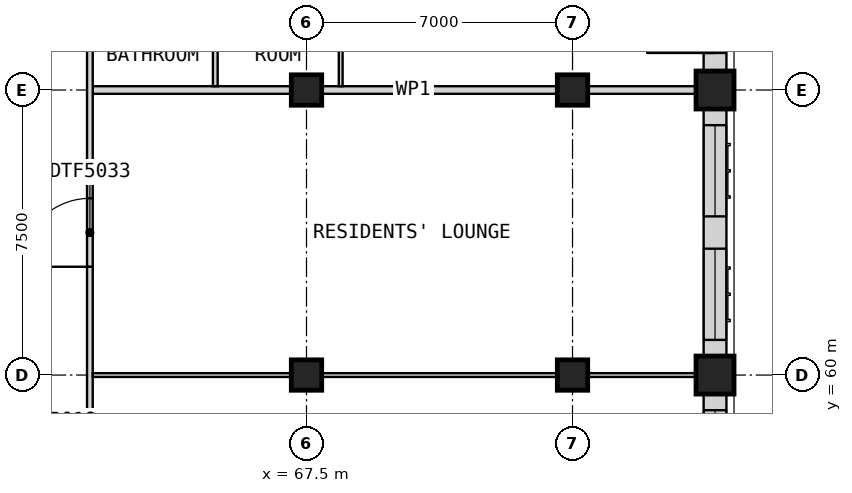
"""IFC4 building model, lengths in metres.
Left out: names, types, materials, properties, quantities, classifications, styles, units other than length and angle.
Written with IfcOpenShell. Run it as: python <this file> out.ifc"""

import sys

from ifc_helpers import new_model, si_unit, direction, frame, frame_2d, origin, origin_2d, place, context, subcontext, project, spatial, rectangle, extrude, element, fill, save


model = new_model("IFC4")
c1 = context("Model", 3, precision=1e-05, world=origin(), true_north=direction((0.0, 1.0)))
c2 = subcontext(c1, "Body", "Model", "MODEL_VIEW")
j1 = project(units=[si_unit("LENGTHUNIT", "METRE"), si_unit("PLANEANGLEUNIT", "RADIAN")], contexts=[c1])
p1 = place(None, origin())
s1 = spatial("IfcSite", under=j1, at=p1, CompositionType="ELEMENT")
p2 = place(p1, origin())
s2 = spatial("IfcBuilding", under=s1, at=p2, CompositionType="ELEMENT")
p3 = place(p2, frame((0.0, 0.0, 219.7)))
s3 = spatial("IfcBuildingStorey", under=s2, at=p3, CompositionType="ELEMENT", Elevation=219.7)
for number, where, z_axis, x_axis in (
    (1, (78.25, 60.0, 0.0), (0.0, 0.0, 1.0), (1.0, 0.0, 0.0)),
    (2, (78.25, 67.5, 0.0), (0.0, 0.0, 1.0), (1.0, 0.0, 0.0)),
):
    element("IfcColumn", number, at=place(p3, frame(where, z_axis=z_axis, x_axis=x_axis)), inside=s3, PredefinedType="COLUMN", context=c2, shape_type="SweptSolid", body=[
        extrude(rectangle(XDim=1.0, YDim=1.0, at=origin_2d()), origin(), (0.0, 0.0, 1.0), 3.5),
    ])
for number, where, z_axis, x_axis in (
    (3, (67.5, 60.0, 0.0), (0.0, 0.0, 1.0), (1.0, 0.0, 0.0)),
    (4, (67.5, 67.5, 0.0), (0.0, 0.0, 1.0), (1.0, 0.0, 0.0)),
    (5, (74.5, 60.0, 0.0), (0.0, 0.0, 1.0), (1.0, 0.0, 0.0)),
    (6, (74.5, 67.5, 0.0), (0.0, 0.0, 1.0), (1.0, 0.0, 0.0)),
):
    element("IfcColumn", number, at=place(p3, frame(where, z_axis=z_axis, x_axis=x_axis)), inside=s3, PredefinedType="COLUMN", context=c2, shape_type="SweptSolid", body=[
        extrude(rectangle(XDim=0.8, YDim=0.8, at=origin_2d()), origin(), (0.0, 0.0, 1.0), 3.5),
    ])
p4 = place(p3, frame((78.25, 53.0, 0.0), z_axis=(0.0, 0.0, 1.0), x_axis=(0.0, 1.0, 0.0)))
e7 = element("IfcWall", 7, at=p4, inside=s3, PredefinedType="SOLIDWALL", context=c2, shape_type="SweptSolid", body=[
    extrude(rectangle(XDim=6.5, YDim=0.6, at=frame_2d((3.25, 0.0))), origin(), (0.0, 0.0, 1.0), 2.75),
])
p5 = place(p4, frame((0.425, 0.0, 0.8)))
e8 = element("IfcOpeningElement", 8, at=p5, cuts=e7, PredefinedType="OPENING", context=c2, shape_type="SweptSolid", body=[
    extrude(rectangle(XDim=2.4, YDim=1.8, at=frame_2d((1.2, 0.9))), frame((0.0, 0.31, 0.0), z_axis=(0.0, -1.0, 0.0), x_axis=(1.0, 0.0, 0.0)), (0.0, 0.0, 1.0), 0.62),
])
p6 = place(p4, frame((3.675, 0.0, 0.8)))
e9 = element("IfcOpeningElement", 9, at=p6, cuts=e7, PredefinedType="OPENING", context=c2, shape_type="SweptSolid", body=[
    extrude(rectangle(XDim=2.4, YDim=1.8, at=frame_2d((1.2, 0.9))), frame((0.0, 0.31, 0.0), z_axis=(0.0, -1.0, 0.0), x_axis=(1.0, 0.0, 0.0)), (0.0, 0.0, 1.0), 0.62),
])
p7 = place(p3, frame((78.25, 60.5, 0.0), z_axis=(0.0, 0.0, 1.0), x_axis=(0.0, 1.0, 0.0)))
e10 = element("IfcWall", 10, at=p7, inside=s3, PredefinedType="SOLIDWALL", context=c2, shape_type="SweptSolid", body=[
    extrude(rectangle(XDim=6.5, YDim=0.6, at=frame_2d((3.25, 0.0))), origin(), (0.0, 0.0, 1.0), 2.75),
])
p8 = place(p7, frame((0.425, 0.0, 0.8)))
e11 = element("IfcOpeningElement", 11, at=p8, cuts=e10, PredefinedType="OPENING", context=c2, shape_type="SweptSolid", body=[
    extrude(rectangle(XDim=2.4, YDim=1.8, at=frame_2d((1.2, 0.9))), frame((0.0, 0.31, 0.0), z_axis=(0.0, -1.0, 0.0), x_axis=(1.0, 0.0, 0.0)), (0.0, 0.0, 1.0), 0.62),
])
p9 = place(p7, frame((3.675, 0.0, 0.8)))
e12 = element("IfcOpeningElement", 12, at=p9, cuts=e10, PredefinedType="OPENING", context=c2, shape_type="SweptSolid", body=[
    extrude(rectangle(XDim=2.4, YDim=1.8, at=frame_2d((1.2, 0.9))), frame((0.0, 0.31, 0.0), z_axis=(0.0, -1.0, 0.0), x_axis=(1.0, 0.0, 0.0)), (0.0, 0.0, 1.0), 0.62),
])
p10 = place(p3, frame((78.25, 68.0, 0.0), z_axis=(0.0, 0.0, 1.0), x_axis=(0.0, 1.0, 0.0)))
e13 = element("IfcWall", 13, at=p10, inside=s3, PredefinedType="SOLIDWALL", context=c2, shape_type="SweptSolid", body=[
    extrude(rectangle(XDim=6.5, YDim=0.6, at=frame_2d((3.25, 0.0))), origin(), (0.0, 0.0, 1.0), 2.75),
])
p11 = place(p10, frame((0.475, 0.0, 0.0)))
e14 = element("IfcOpeningElement", 14, at=p11, cuts=e13, PredefinedType="OPENING", context=c2, shape_type="SweptSolid", body=[
    extrude(rectangle(XDim=1.8, YDim=2.4, at=frame_2d((0.9, 1.2))), frame((0.0, 0.31, 0.0), z_axis=(0.0, -1.0, 0.0), x_axis=(1.0, 0.0, 0.0)), (0.0, 0.0, 1.0), 0.62),
])
p12 = place(p10, frame((3.675, 0.0, 0.8)))
e15 = element("IfcOpeningElement", 15, at=p12, cuts=e13, PredefinedType="OPENING", context=c2, shape_type="SweptSolid", body=[
    extrude(rectangle(XDim=2.4, YDim=1.8, at=frame_2d((1.2, 0.9))), frame((0.0, 0.31, 0.0), z_axis=(0.0, -1.0, 0.0), x_axis=(1.0, 0.0, 0.0)), (0.0, 0.0, 1.0), 0.62),
])
p13 = place(p3, frame((61.875, 67.5, 0.0), z_axis=(0.0, 0.0, 1.0), x_axis=(1.0, 0.0, 0.0)))
e16 = element("IfcWall", 16, at=p13, inside=s3, PredefinedType="PARTITIONING", context=c2, shape_type="SweptSolid", body=[
    extrude(rectangle(XDim=16.875, YDim=0.2, at=frame_2d((8.438, 0.0))), origin(), (0.0, 0.0, 1.0), 3.25),
])
p14 = place(p3, frame((61.8, 58.275, 0.0), z_axis=(0.0, 0.0, 1.0), x_axis=(0.0, 1.0, 0.0)))
e17 = element("IfcWall", 17, at=p14, inside=s3, PredefinedType="PARTITIONING", context=c2, shape_type="SweptSolid", body=[
    extrude(rectangle(XDim=25.95, YDim=0.15, at=frame_2d((12.975, 0.0))), origin(), (0.0, 0.0, 1.0), 3.25),
])
p15 = place(p14, frame((4.575, 0.0, 0.0)))
e18 = element("IfcOpeningElement", 18, at=p15, cuts=e17, PredefinedType="OPENING", context=c2, shape_type="SweptSolid", body=[
    extrude(rectangle(XDim=1.8, YDim=2.1, at=frame_2d((0.9, 1.05))), frame((0.0, 0.085, 0.0), z_axis=(0.0, -1.0, 0.0), x_axis=(1.0, 0.0, 0.0)), (0.0, 0.0, 1.0), 0.17),
])
p16 = place(p14, frame((14.4, 0.0, 0.0)))
e19 = element("IfcOpeningElement", 19, at=p16, cuts=e17, PredefinedType="OPENING", context=c2, shape_type="SweptSolid", body=[
    extrude(rectangle(XDim=0.9, YDim=2.1, at=frame_2d((0.45, 1.05))), frame((0.0, 0.085, 0.0), z_axis=(0.0, -1.0, 0.0), x_axis=(1.0, 0.0, 0.0)), (0.0, 0.0, 1.0), 0.17),
])
p17 = place(p3, frame((61.875, 60.0, 0.0), z_axis=(0.0, 0.0, 1.0), x_axis=(1.0, 0.0, 0.0)))
e20 = element("IfcWall", 20, at=p17, inside=s3, PredefinedType="PARTITIONING", context=c2, shape_type="SweptSolid", body=[
    extrude(rectangle(XDim=16.875, YDim=0.1, at=frame_2d((8.438, 0.0))), origin(), (0.0, 0.0, 1.0), 3.25),
])
p18 = place(p3, frame((68.4, 67.6, 0.0), z_axis=(0.0, 0.0, 1.0), x_axis=(0.0, 1.0, 0.0)))
e21 = element("IfcWall", 21, at=p18, inside=s3, PredefinedType="PARTITIONING", context=c2, shape_type="SweptSolid", body=[
    extrude(rectangle(XDim=14.8, YDim=0.1, at=frame_2d((7.4, 0.0))), origin(), (0.0, 0.0, 1.0), 3.25),
])
p19 = place(p18, frame((1.325, 0.0, 0.0)))
e22 = element("IfcOpeningElement", 22, at=p19, cuts=e21, PredefinedType="OPENING", context=c2, shape_type="SweptSolid", body=[
    extrude(rectangle(XDim=0.9, YDim=2.1, at=frame_2d((0.45, 1.05))), frame((0.0, 0.06, 0.0), z_axis=(0.0, -1.0, 0.0), x_axis=(1.0, 0.0, 0.0)), (0.0, 0.0, 1.0), 0.12),
])
p20 = place(p18, frame((5.075, 0.0, 0.0)))
e23 = element("IfcOpeningElement", 23, at=p20, cuts=e21, PredefinedType="OPENING", context=c2, shape_type="SweptSolid", body=[
    extrude(rectangle(XDim=0.9, YDim=2.1, at=frame_2d((0.45, 1.05))), frame((0.0, 0.06, 0.0), z_axis=(0.0, -1.0, 0.0), x_axis=(1.0, 0.0, 0.0)), (0.0, 0.0, 1.0), 0.12),
])
p21 = place(p18, frame((12.575, 0.0, 0.0)))
e24 = element("IfcOpeningElement", 24, at=p21, cuts=e21, PredefinedType="OPENING", context=c2, shape_type="SweptSolid", body=[
    extrude(rectangle(XDim=0.9, YDim=2.1, at=frame_2d((0.45, 1.05))), frame((0.0, 0.06, 0.0), z_axis=(0.0, -1.0, 0.0), x_axis=(1.0, 0.0, 0.0)), (0.0, 0.0, 1.0), 0.12),
])
p22 = place(p3, frame((65.1, 67.6, 0.0), z_axis=(0.0, 0.0, 1.0), x_axis=(0.0, 1.0, 0.0)))
e25 = element("IfcWall", 25, at=p22, inside=s3, PredefinedType="PARTITIONING", context=c2, shape_type="SweptSolid", body=[
    extrude(rectangle(XDim=3.587, YDim=0.125, at=frame_2d((1.794, 0.0))), origin(), (0.0, 0.0, 1.0), 3.25),
])
p23 = place(p22, frame((1.325, 0.0, 0.0)))
e26 = element("IfcOpeningElement", 26, at=p23, cuts=e25, PredefinedType="OPENING", context=c2, shape_type="SweptSolid", body=[
    extrude(rectangle(XDim=0.9, YDim=2.1, at=frame_2d((0.45, 1.05))), frame((0.0, 0.073, 0.0), z_axis=(0.0, -1.0, 0.0), x_axis=(1.0, 0.0, 0.0)), (0.0, 0.0, 1.0), 0.145),
])
p24 = place(p6, origin())
e27 = element("IfcWindow", 27, at=p24, inside=s3, PartitioningType="SINGLE_PANEL", PredefinedType="WINDOW", context=c2, shape_type="SweptSolid", body=[
    extrude(rectangle(XDim=2.4, YDim=1.8, at=frame_2d((1.2, 0.9))), frame((0.0, -0.07, 0.0), z_axis=(0.0, -1.0, 0.0), x_axis=(1.0, 0.0, 0.0)), (0.0, 0.0, 1.0), 0.06),
])
fill(e9, e27)
p25 = place(p8, origin())
e28 = element("IfcWindow", 28, at=p25, inside=s3, PartitioningType="SINGLE_PANEL", PredefinedType="WINDOW", context=c2, shape_type="SweptSolid", body=[
    extrude(rectangle(XDim=2.4, YDim=1.8, at=frame_2d((1.2, 0.9))), frame((0.0, -0.07, 0.0), z_axis=(0.0, -1.0, 0.0), x_axis=(1.0, 0.0, 0.0)), (0.0, 0.0, 1.0), 0.06),
])
fill(e11, e28)
p26 = place(p9, origin())
e29 = element("IfcWindow", 29, at=p26, inside=s3, PartitioningType="SINGLE_PANEL", PredefinedType="WINDOW", context=c2, shape_type="SweptSolid", body=[
    extrude(rectangle(XDim=2.4, YDim=1.8, at=frame_2d((1.2, 0.9))), frame((0.0, -0.07, 0.0), z_axis=(0.0, -1.0, 0.0), x_axis=(1.0, 0.0, 0.0)), (0.0, 0.0, 1.0), 0.06),
])
fill(e12, e29)
p27 = place(p11, origin())
e30 = element("IfcDoor", 30, at=p27, inside=s3, OperationType="SINGLE_SWING_LEFT", PredefinedType="DOOR", context=c2, shape_type="SweptSolid", body=[
    extrude(rectangle(XDim=1.8, YDim=2.4, at=frame_2d((0.9, 1.2))), frame((0.0, -0.075, 0.0), z_axis=(0.0, -1.0, 0.0), x_axis=(1.0, 0.0, 0.0)), (0.0, 0.0, 1.0), 0.05),
])
fill(e14, e30)
p28 = place(p15, origin())
e31 = element("IfcDoor", 31, at=p28, inside=s3, OperationType="DOUBLE_DOOR_SINGLE_SWING", PredefinedType="DOOR", context=c2, shape_type="SweptSolid", body=[
    extrude(rectangle(XDim=1.8, YDim=2.1, at=frame_2d((0.9, 1.05))), frame((0.0, 0.025, 0.0), z_axis=(0.0, -1.0, 0.0), x_axis=(1.0, 0.0, 0.0)), (0.0, 0.0, 1.0), 0.05),
])
fill(e18, e31)
save(model, sys.argv[1])
